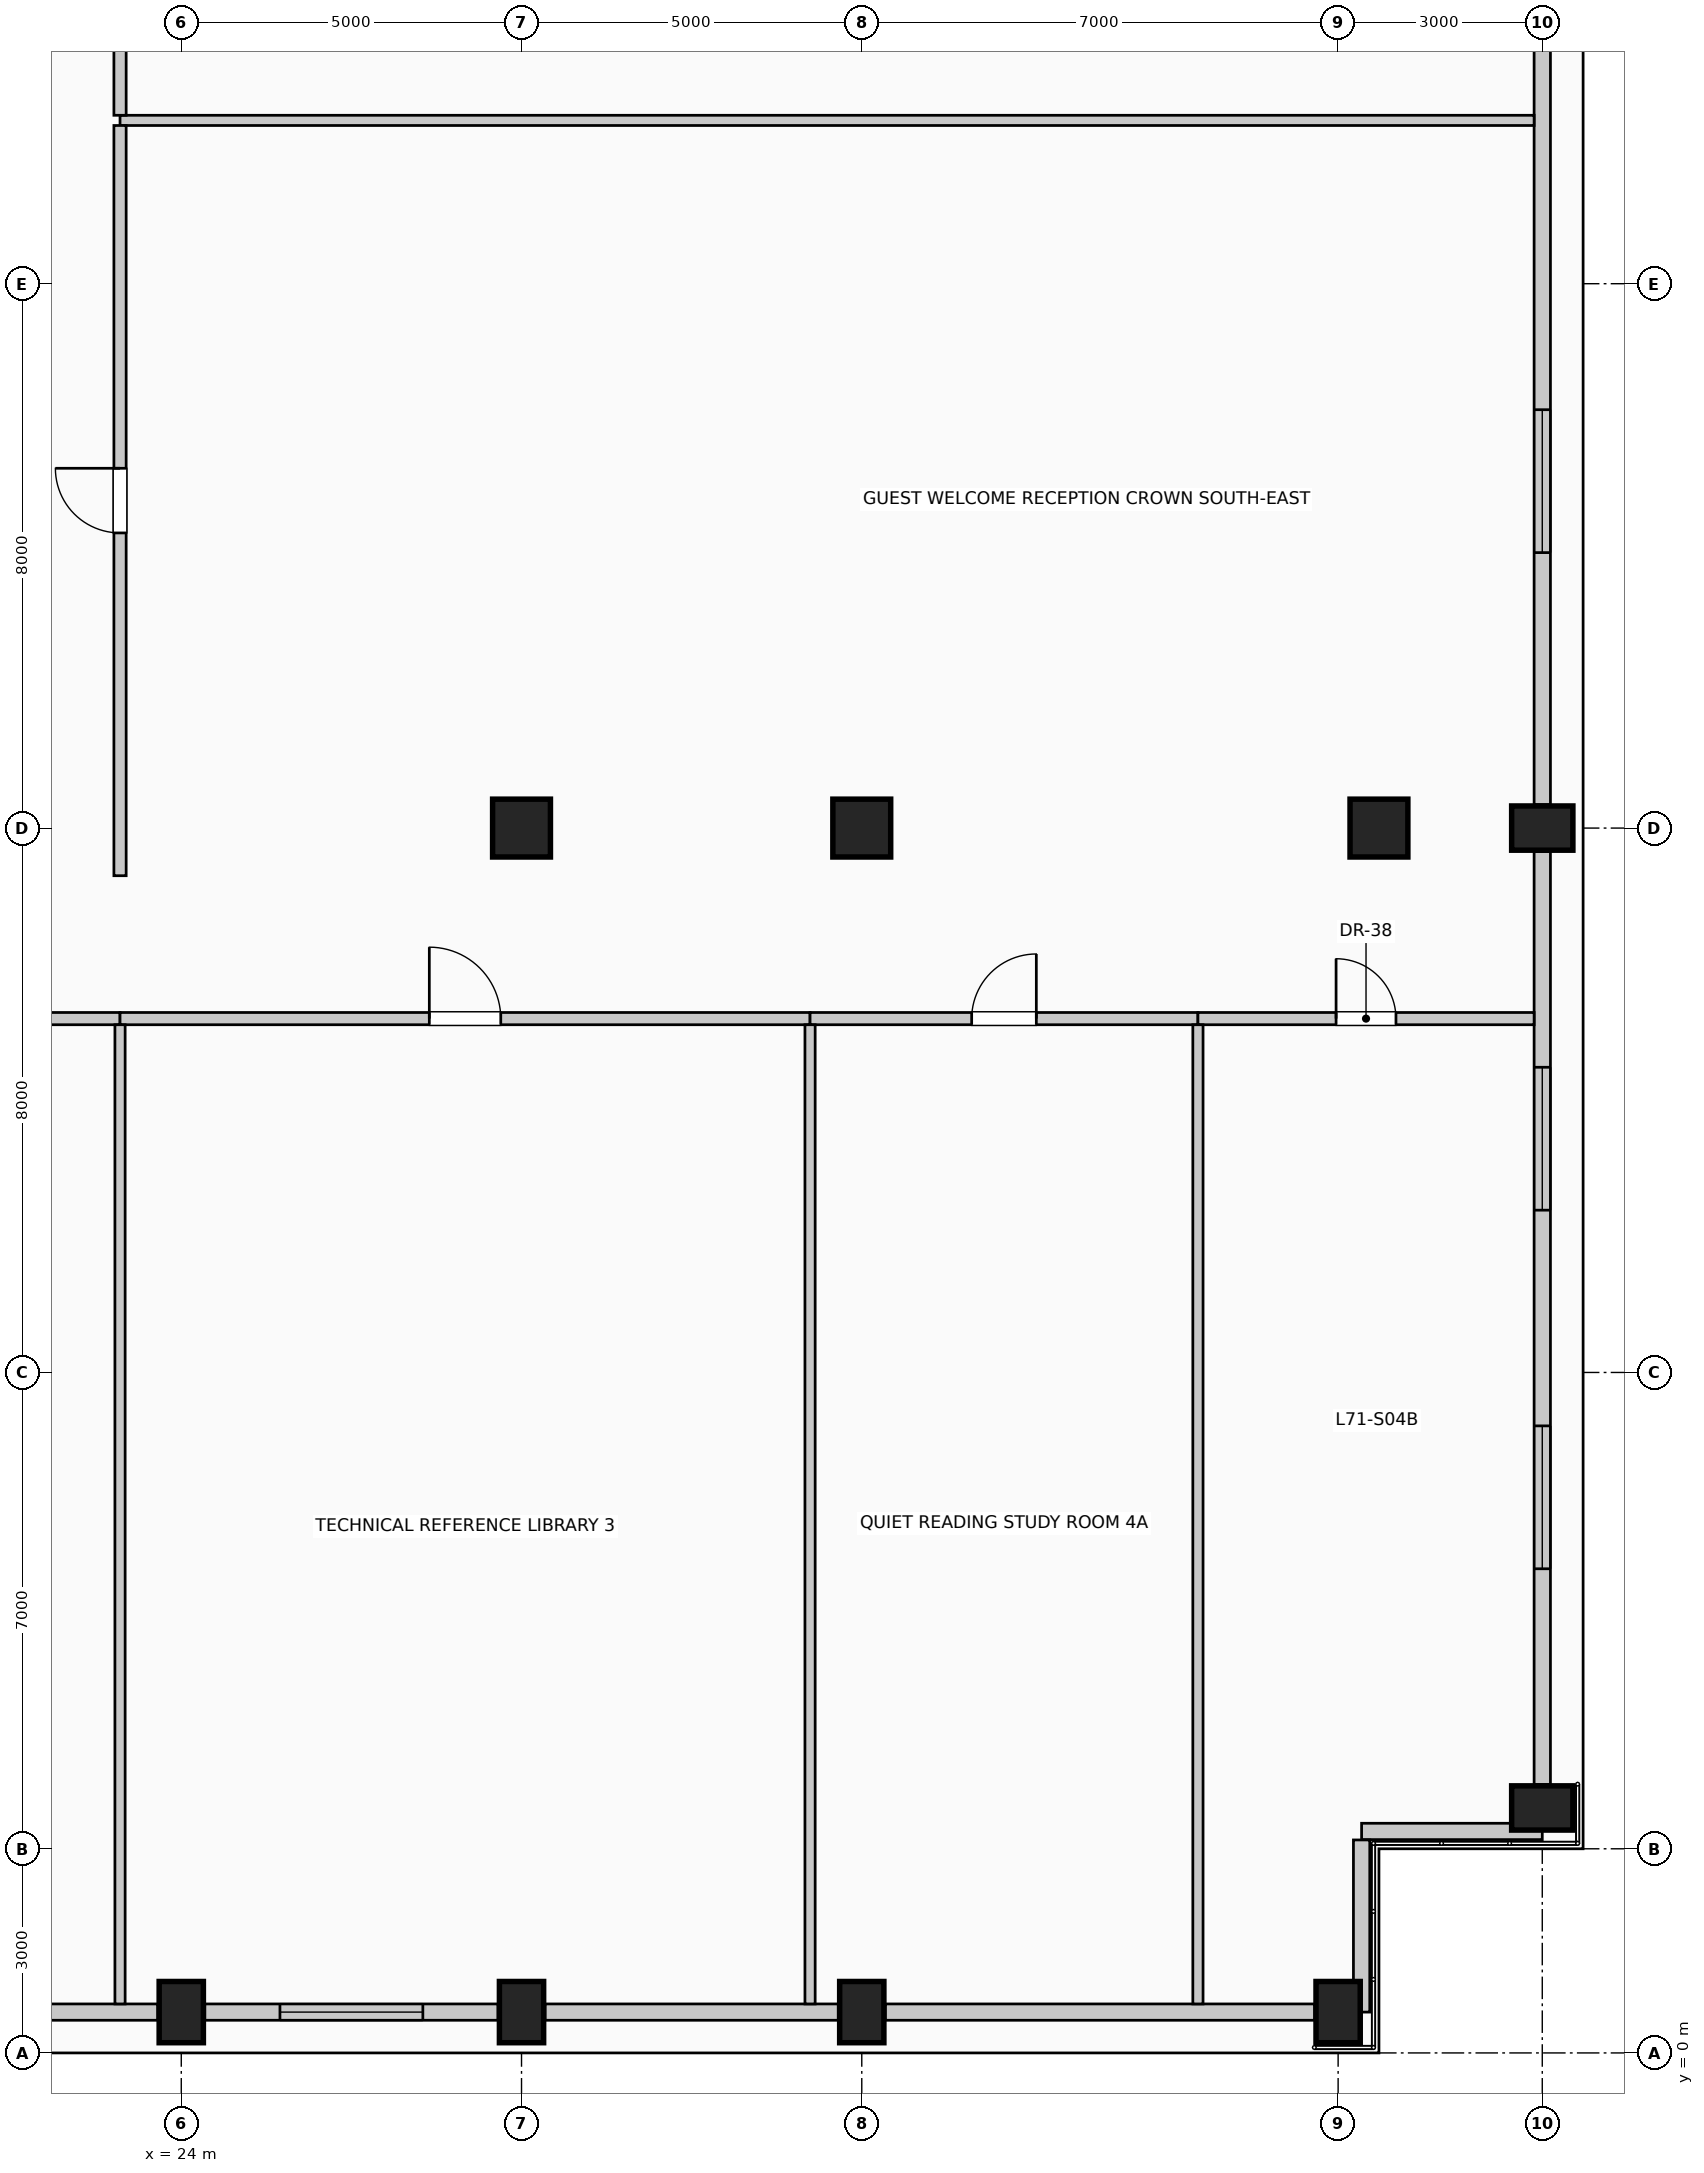
"""IFC4 building model, lengths in metres.
Left out: names, types, materials, properties, quantities, classifications, styles, units other than length and angle.
Written with IfcOpenShell. Run it as: python <this file> out.ifc"""

import sys

from ifc_helpers import new_model, si_unit, direction, frame, frame_2d, origin, origin_2d, place, context, subcontext, project, spatial, rectangle, circle, extrude, element, fill, save


model = new_model("IFC4")
c1 = context("Model", 3, precision=1e-05, world=origin(), true_north=direction((0.0, 1.0)))
c2 = subcontext(c1, "Body", "Model", "MODEL_VIEW")
j1 = project(units=[si_unit("LENGTHUNIT", "METRE"), si_unit("PLANEANGLEUNIT", "RADIAN")], contexts=[c1])
p1 = place(None, origin())
s1 = spatial("IfcSite", under=j1, at=p1, CompositionType="ELEMENT")
p2 = place(p1, origin())
s2 = spatial("IfcBuilding", under=s1, at=p2, CompositionType="ELEMENT")
p3 = place(p2, frame((0.0, 0.0, 293.0)))
s3 = spatial("IfcBuildingStorey", under=s2, at=p3, CompositionType="ELEMENT", Elevation=293.0)
for number, where, z_axis, x_axis in (
    (1, (24.0, 0.6, 0.0), (0.0, 0.0, 1.0), (1.0, 0.0, 0.0)),
    (2, (29.0, 0.6, 0.0), (0.0, 0.0, 1.0), (1.0, 0.0, 0.0)),
    (3, (34.0, 0.6, 0.0), (0.0, 0.0, 1.0), (1.0, 0.0, 0.0)),
    (4, (41.0, 0.6, 0.0), (0.0, 0.0, 1.0), (1.0, 0.0, 0.0)),
    (5, (44.0, 3.6, 0.0), (0.0, 0.0, 1.0), (0.0, 1.0, 0.0)),
    (6, (44.0, 18.0, 0.0), (0.0, 0.0, 1.0), (0.0, 1.0, 0.0)),
):
    element("IfcColumn", number, at=place(p3, frame(where, z_axis=z_axis, x_axis=x_axis)), inside=s3, PredefinedType="COLUMN", context=c2, shape_type="SweptSolid", body=[
        extrude(rectangle(XDim=0.65, YDim=0.9, at=origin_2d()), origin(), (0.0, 0.0, 1.0), 4.0),
    ])
for number, where, z_axis, x_axis in (
    (7, (29.0, 18.0, 0.0), (0.0, 0.0, 1.0), (1.0, 0.0, 0.0)),
    (8, (41.6, 18.0, 0.0), (0.0, 0.0, 1.0), (1.0, 0.0, 0.0)),
    (9, (34.0, 18.0, 0.0), (0.0, 0.0, 1.0), (1.0, 0.0, 0.0)),
):
    element("IfcColumn", number, at=place(p3, frame(where, z_axis=z_axis, x_axis=x_axis)), inside=s3, PredefinedType="COLUMN", context=c2, shape_type="SweptSolid", body=[
        extrude(circle(Radius=0.425, at=origin_2d()), origin(), (0.0, 0.0, 1.0), 4.0),
    ])
p4 = place(p3, frame((23.655, 0.6, 0.0), z_axis=(0.0, 0.0, 1.0), x_axis=(-1.0, 0.0, 0.0)))
e10 = element("IfcWall", 10, at=p4, inside=s3, PredefinedType="SOLIDWALL", context=c2, shape_type="SweptSolid", body=[
    extrude(rectangle(XDim=6.91, YDim=0.24, at=frame_2d((3.455, 0.0))), origin(), (0.0, 0.0, 1.0), 3.025),
])
p5 = place(p4, frame((3.907, 0.0, 0.35)))
e11 = element("IfcOpeningElement", 11, at=p5, cuts=e10, PredefinedType="OPENING", context=c2, shape_type="SweptSolid", body=[
    extrude(rectangle(XDim=2.1, YDim=2.2, at=frame_2d((1.05, 1.1))), frame((0.0, 0.13, 0.0), z_axis=(0.0, -1.0, 0.0), x_axis=(1.0, 0.0, 0.0)), (0.0, 0.0, 1.0), 0.26),
])
p6 = place(p3, frame((28.655, 0.6, 0.0), z_axis=(0.0, 0.0, 1.0), x_axis=(-1.0, 0.0, 0.0)))
e12 = element("IfcWall", 12, at=p6, inside=s3, PredefinedType="SOLIDWALL", context=c2, shape_type="SweptSolid", body=[
    extrude(rectangle(XDim=4.31, YDim=0.24, at=frame_2d((2.155, 0.0))), origin(), (0.0, 0.0, 1.0), 3.025),
])
p7 = place(p6, frame((1.105, 0.0, 0.35)))
e13 = element("IfcOpeningElement", 13, at=p7, cuts=e12, PredefinedType="OPENING", context=c2, shape_type="SweptSolid", body=[
    extrude(rectangle(XDim=2.1, YDim=2.2, at=frame_2d((1.05, 1.1))), frame((0.0, 0.13, 0.0), z_axis=(0.0, -1.0, 0.0), x_axis=(1.0, 0.0, 0.0)), (0.0, 0.0, 1.0), 0.26),
])
p8 = place(p3, frame((33.655, 0.6, 0.0), z_axis=(0.0, 0.0, 1.0), x_axis=(-1.0, 0.0, 0.0)))
e14 = element("IfcWall", 14, at=p8, inside=s3, PredefinedType="SOLIDWALL", context=c2, shape_type="SweptSolid", body=[
    extrude(rectangle(XDim=4.31, YDim=0.24, at=frame_2d((2.155, 0.0))), origin(), (0.0, 0.0, 1.0), 2.175),
])
p9 = place(p3, frame((40.655, 0.6, 0.0), z_axis=(0.0, 0.0, 1.0), x_axis=(-1.0, 0.0, 0.0)))
e15 = element("IfcWall", 15, at=p9, inside=s3, PredefinedType="SOLIDWALL", context=c2, shape_type="SweptSolid", body=[
    extrude(rectangle(XDim=6.31, YDim=0.24, at=frame_2d((3.155, 0.0))), origin(), (0.0, 0.0, 1.0), 2.175),
])
p10 = place(p3, frame((44.0, 17.655, 0.0), z_axis=(0.0, 0.0, 1.0), x_axis=(0.0, -1.0, 0.0)))
e16 = element("IfcWall", 16, at=p10, inside=s3, PredefinedType="SOLIDWALL", context=c2, shape_type="SweptSolid", body=[
    extrude(rectangle(XDim=13.71, YDim=0.24, at=frame_2d((6.855, 0.0))), origin(), (0.0, 0.0, 1.0), 3.015),
])
p11 = place(p10, frame((3.17, 0.0, 0.35)))
e17 = element("IfcOpeningElement", 17, at=p11, cuts=e16, PredefinedType="OPENING", context=c2, shape_type="SweptSolid", body=[
    extrude(rectangle(XDim=2.1, YDim=2.2, at=frame_2d((1.05, 1.1))), frame((0.0, 0.13, 0.0), z_axis=(0.0, -1.0, 0.0), x_axis=(1.0, 0.0, 0.0)), (0.0, 0.0, 1.0), 0.26),
])
p12 = place(p10, frame((8.44, 0.0, 0.35)))
e18 = element("IfcOpeningElement", 18, at=p12, cuts=e16, PredefinedType="OPENING", context=c2, shape_type="SweptSolid", body=[
    extrude(rectangle(XDim=2.1, YDim=2.2, at=frame_2d((1.05, 1.1))), frame((0.0, 0.13, 0.0), z_axis=(0.0, -1.0, 0.0), x_axis=(1.0, 0.0, 0.0)), (0.0, 0.0, 1.0), 0.26),
])
p13 = place(p3, frame((44.0, 33.655, 0.0), z_axis=(0.0, 0.0, 1.0), x_axis=(0.0, -1.0, 0.0)))
e19 = element("IfcWall", 19, at=p13, inside=s3, PredefinedType="SOLIDWALL", context=c2, shape_type="SweptSolid", body=[
    extrude(rectangle(XDim=15.31, YDim=0.24, at=frame_2d((7.655, 0.0))), origin(), (0.0, 0.0, 1.0), 3.015),
])
p14 = place(p13, frame((9.507, 0.0, 0.35)))
e20 = element("IfcOpeningElement", 20, at=p14, cuts=e19, PredefinedType="OPENING", context=c2, shape_type="SweptSolid", body=[
    extrude(rectangle(XDim=2.1, YDim=2.2, at=frame_2d((1.05, 1.1))), frame((0.0, 0.13, 0.0), z_axis=(0.0, -1.0, 0.0), x_axis=(1.0, 0.0, 0.0)), (0.0, 0.0, 1.0), 0.26),
])
p15 = place(p3, frame((44.0, 3.255, 0.0), z_axis=(0.0, 0.0, 1.0), x_axis=(-1.0, 0.0, 0.0)))
e21 = element("IfcWall", 21, at=p15, inside=s3, PredefinedType="SOLIDWALL", context=c2, shape_type="SweptSolid", body=[
    extrude(rectangle(XDim=2.655, YDim=0.24, at=frame_2d((1.328, 0.0))), origin(), (0.0, 0.0, 1.0), 2.165),
])
p16 = place(p3, frame((41.345, 3.13, 0.0), z_axis=(0.0, 0.0, 1.0), x_axis=(0.0, -1.0, 0.0)))
e22 = element("IfcWall", 22, at=p16, inside=s3, PredefinedType="SOLIDWALL", context=c2, shape_type="SweptSolid", body=[
    extrude(rectangle(XDim=2.53, YDim=0.24, at=frame_2d((1.265, 0.0))), origin(), (0.0, 0.0, 1.0), 2.165),
])
p17 = place(p3, frame((16.64, 15.2, 0.0), z_axis=(0.0, 0.0, 1.0), x_axis=(1.0, 0.0, 0.0)))
e23 = element("IfcWall", 23, at=p17, inside=s3, PredefinedType="PARTITIONING", context=c2, shape_type="SweptSolid", body=[
    extrude(rectangle(XDim=6.46, YDim=0.18, at=frame_2d((3.23, 0.0))), origin(), (0.0, 0.0, 1.0), 3.775),
])
p18 = place(p17, frame((2.755, 0.0, 0.0)))
e24 = element("IfcOpeningElement", 24, at=p18, cuts=e23, PredefinedType="OPENING", context=c2, shape_type="SweptSolid", body=[
    extrude(rectangle(XDim=0.95, YDim=2.15, at=frame_2d((0.475, 1.075))), frame((0.0, 0.1, 0.0), z_axis=(0.0, -1.0, 0.0), x_axis=(1.0, 0.0, 0.0)), (0.0, 0.0, 1.0), 0.2),
])
p19 = place(p3, frame((23.1, 15.2, 0.0), z_axis=(0.0, 0.0, 1.0), x_axis=(1.0, 0.0, 0.0)))
e25 = element("IfcWall", 25, at=p19, inside=s3, PredefinedType="PARTITIONING", context=c2, shape_type="SweptSolid", body=[
    extrude(rectangle(XDim=10.14, YDim=0.18, at=frame_2d((5.07, 0.0))), origin(), (0.0, 0.0, 1.0), 3.775),
])
p20 = place(p19, frame((4.545, 0.0, 0.0)))
e26 = element("IfcOpeningElement", 26, at=p20, cuts=e25, PredefinedType="OPENING", context=c2, shape_type="SweptSolid", body=[
    extrude(rectangle(XDim=1.05, YDim=2.15, at=frame_2d((0.525, 1.075))), frame((0.0, 0.1, 0.0), z_axis=(0.0, -1.0, 0.0), x_axis=(1.0, 0.0, 0.0)), (0.0, 0.0, 1.0), 0.2),
])
p21 = place(p3, frame((33.24, 15.2, 0.0), z_axis=(0.0, 0.0, 1.0), x_axis=(1.0, 0.0, 0.0)))
e27 = element("IfcWall", 27, at=p21, inside=s3, PredefinedType="PARTITIONING", context=c2, shape_type="SweptSolid", body=[
    extrude(rectangle(XDim=5.7, YDim=0.18, at=frame_2d((2.85, 0.0))), origin(), (0.0, 0.0, 1.0), 3.775),
])
p22 = place(p21, frame((2.375, 0.0, 0.0)))
e28 = element("IfcOpeningElement", 28, at=p22, cuts=e27, PredefinedType="OPENING", context=c2, shape_type="SweptSolid", body=[
    extrude(rectangle(XDim=0.95, YDim=2.15, at=frame_2d((0.475, 1.075))), frame((0.0, 0.1, 0.0), z_axis=(0.0, -1.0, 0.0), x_axis=(1.0, 0.0, 0.0)), (0.0, 0.0, 1.0), 0.2),
])
p23 = place(p3, frame((38.94, 15.2, 0.0), z_axis=(0.0, 0.0, 1.0), x_axis=(1.0, 0.0, 0.0)))
e29 = element("IfcWall", 29, at=p23, inside=s3, PredefinedType="PARTITIONING", context=c2, shape_type="SweptSolid", body=[
    extrude(rectangle(XDim=4.94, YDim=0.18, at=frame_2d((2.47, 0.0))), origin(), (0.0, 0.0, 1.0), 3.775),
])
p24 = place(p23, frame((2.03, 0.0, 0.0)))
e30 = element("IfcOpeningElement", 30, at=p24, cuts=e29, PredefinedType="OPENING", context=c2, shape_type="SweptSolid", body=[
    extrude(rectangle(XDim=0.88, YDim=2.1, at=frame_2d((0.44, 1.05))), frame((0.0, 0.1, 0.0), z_axis=(0.0, -1.0, 0.0), x_axis=(1.0, 0.0, 0.0)), (0.0, 0.0, 1.0), 0.2),
])
p25 = place(p3, frame((23.1, 28.4, 0.0), z_axis=(0.0, 0.0, 1.0), x_axis=(1.0, 0.0, 0.0)))
e31 = element("IfcWall", 31, at=p25, inside=s3, PredefinedType="PARTITIONING", context=c2, shape_type="SweptSolid", body=[
    extrude(rectangle(XDim=20.78, YDim=0.15, at=frame_2d((10.39, 0.0))), origin(), (0.0, 0.0, 1.0), 3.775),
])
p26 = place(p3, frame((23.1, 0.72, 0.0), z_axis=(0.0, 0.0, 1.0), x_axis=(0.0, 1.0, 0.0)))
e32 = element("IfcWall", 32, at=p26, inside=s3, PredefinedType="PARTITIONING", context=c2, shape_type="SweptSolid", body=[
    extrude(rectangle(XDim=14.39, YDim=0.15, at=frame_2d((7.195, 0.0))), origin(), (0.0, 0.0, 1.0), 3.775),
])
p27 = place(p3, frame((23.1, 17.3, 0.0), z_axis=(0.0, 0.0, 1.0), x_axis=(0.0, 1.0, 0.0)))
e33 = element("IfcWall", 33, at=p27, inside=s3, PredefinedType="PARTITIONING", context=c2, shape_type="SweptSolid", body=[
    extrude(rectangle(XDim=11.025, YDim=0.18, at=frame_2d((5.512, 0.0))), origin(), (0.0, 0.0, 1.0), 3.775),
])
p28 = place(p27, frame((5.038, 0.0, 0.0)))
e34 = element("IfcOpeningElement", 34, at=p28, cuts=e33, PredefinedType="OPENING", context=c2, shape_type="SweptSolid", body=[
    extrude(rectangle(XDim=0.95, YDim=2.15, at=frame_2d((0.475, 1.075))), frame((0.0, 0.1, 0.0), z_axis=(0.0, -1.0, 0.0), x_axis=(1.0, 0.0, 0.0)), (0.0, 0.0, 1.0), 0.2),
])
p29 = place(p3, frame((23.1, 28.475, 0.0), z_axis=(0.0, 0.0, 1.0), x_axis=(0.0, 1.0, 0.0)))
e35 = element("IfcWall", 35, at=p29, inside=s3, PredefinedType="PARTITIONING", context=c2, shape_type="SweptSolid", body=[
    extrude(rectangle(XDim=5.435, YDim=0.18, at=frame_2d((2.717, 0.0))), origin(), (0.0, 0.0, 1.0), 3.775),
])
p30 = place(p29, frame((2.192, 0.0, 0.0)))
e36 = element("IfcOpeningElement", 36, at=p30, cuts=e35, PredefinedType="OPENING", context=c2, shape_type="SweptSolid", body=[
    extrude(rectangle(XDim=1.05, YDim=2.15, at=frame_2d((0.525, 1.075))), frame((0.0, 0.1, 0.0), z_axis=(0.0, -1.0, 0.0), x_axis=(1.0, 0.0, 0.0)), (0.0, 0.0, 1.0), 0.2),
])
for number, where, z_axis, x_axis in (
    (37, (33.24, 0.72, 0.0), (0.0, 0.0, 1.0), (0.0, 1.0, 0.0)),
    (38, (38.94, 0.72, 0.0), (0.0, 0.0, 1.0), (0.0, 1.0, 0.0)),
):
    element("IfcWall", number, at=place(p3, frame(where, z_axis=z_axis, x_axis=x_axis)), inside=s3, PredefinedType="PARTITIONING", context=c2, shape_type="SweptSolid", body=[
        extrude(rectangle(XDim=14.39, YDim=0.15, at=frame_2d((7.195, 0.0))), origin(), (0.0, 0.0, 1.0), 3.775),
    ])
p31 = place(p7, origin())
e39 = element("IfcWindow", 39, at=p31, inside=s3, PartitioningType="SINGLE_PANEL", PredefinedType="WINDOW", context=c2, shape_type="SweptSolid", body=[
    extrude(rectangle(XDim=2.1, YDim=2.2, at=frame_2d((1.05, 1.1))), frame((0.0, 0.03, 0.0), z_axis=(0.0, -1.0, 0.0), x_axis=(1.0, 0.0, 0.0)), (0.0, 0.0, 1.0), 0.06),
])
fill(e13, e39)
p32 = place(p11, origin())
e40 = element("IfcWindow", 40, at=p32, inside=s3, PartitioningType="SINGLE_PANEL", PredefinedType="WINDOW", context=c2, shape_type="SweptSolid", body=[
    extrude(rectangle(XDim=2.1, YDim=2.2, at=frame_2d((1.05, 1.1))), frame((0.0, 0.03, 0.0), z_axis=(0.0, -1.0, 0.0), x_axis=(1.0, 0.0, 0.0)), (0.0, 0.0, 1.0), 0.06),
])
fill(e17, e40)
p33 = place(p12, origin())
e41 = element("IfcWindow", 41, at=p33, inside=s3, PartitioningType="SINGLE_PANEL", PredefinedType="WINDOW", context=c2, shape_type="SweptSolid", body=[
    extrude(rectangle(XDim=2.1, YDim=2.2, at=frame_2d((1.05, 1.1))), frame((0.0, 0.03, 0.0), z_axis=(0.0, -1.0, 0.0), x_axis=(1.0, 0.0, 0.0)), (0.0, 0.0, 1.0), 0.06),
])
fill(e18, e41)
p34 = place(p14, origin())
e42 = element("IfcWindow", 42, at=p34, inside=s3, PartitioningType="SINGLE_PANEL", PredefinedType="WINDOW", context=c2, shape_type="SweptSolid", body=[
    extrude(rectangle(XDim=2.1, YDim=2.2, at=frame_2d((1.05, 1.1))), frame((0.0, 0.03, 0.0), z_axis=(0.0, -1.0, 0.0), x_axis=(1.0, 0.0, 0.0)), (0.0, 0.0, 1.0), 0.06),
])
fill(e20, e42)
p35 = place(p20, origin())
e43 = element("IfcDoor", 43, at=p35, inside=s3, OperationType="SINGLE_SWING_LEFT", PredefinedType="DOOR", context=c2, shape_type="SweptSolid", body=[
    extrude(rectangle(XDim=1.05, YDim=2.15, at=frame_2d((0.525, 1.075))), frame((0.0, 0.025, 0.0), z_axis=(0.0, -1.0, 0.0), x_axis=(1.0, 0.0, 0.0)), (0.0, 0.0, 1.0), 0.05),
])
fill(e26, e43)
p36 = place(p22, origin())
e44 = element("IfcDoor", 44, at=p36, inside=s3, OperationType="SINGLE_SWING_RIGHT", PredefinedType="DOOR", context=c2, shape_type="SweptSolid", body=[
    extrude(rectangle(XDim=0.95, YDim=2.15, at=frame_2d((0.475, 1.075))), frame((0.0, 0.025, 0.0), z_axis=(0.0, -1.0, 0.0), x_axis=(1.0, 0.0, 0.0)), (0.0, 0.0, 1.0), 0.05),
])
fill(e28, e44)
p37 = place(p24, origin())
e45 = element("IfcDoor", 45, at=p37, inside=s3, OperationType="SINGLE_SWING_LEFT", PredefinedType="DOOR", context=c2, shape_type="SweptSolid", body=[
    extrude(rectangle(XDim=0.88, YDim=2.1, at=frame_2d((0.44, 1.05))), frame((0.0, 0.025, 0.0), z_axis=(0.0, -1.0, 0.0), x_axis=(1.0, 0.0, 0.0)), (0.0, 0.0, 1.0), 0.05),
])
fill(e30, e45)
p38 = place(p28, origin())
e46 = element("IfcDoor", 46, at=p38, inside=s3, OperationType="SINGLE_SWING_RIGHT", PredefinedType="DOOR", context=c2, shape_type="SweptSolid", body=[
    extrude(rectangle(XDim=0.95, YDim=2.15, at=frame_2d((0.475, 1.075))), frame((0.0, 0.025, 0.0), z_axis=(0.0, -1.0, 0.0), x_axis=(1.0, 0.0, 0.0)), (0.0, 0.0, 1.0), 0.05),
])
fill(e34, e46)
save(model, sys.argv[1])
